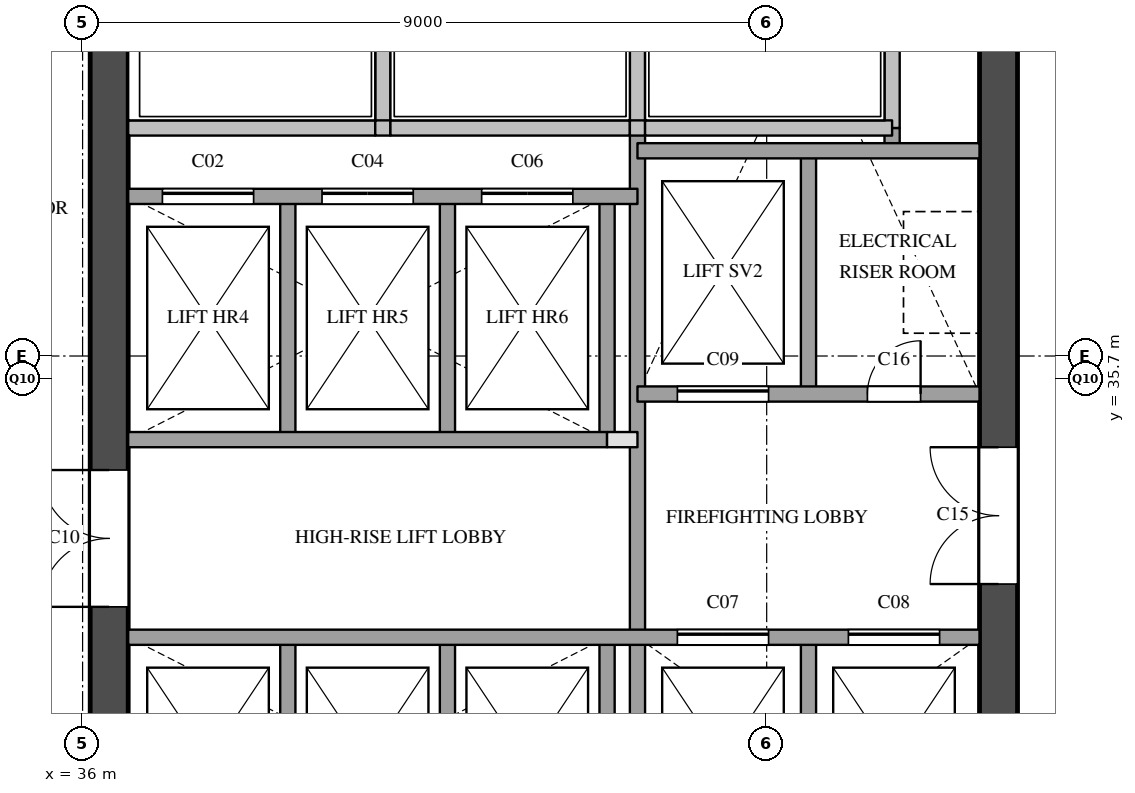
"""IFC4 building model, lengths in metres.
Left out: names, types, materials, properties, quantities, classifications, styles, units other than length and angle.
Written with IfcOpenShell. Run it as: python <this file> out.ifc"""

import sys

from ifc_helpers import new_model, si_unit, direction, frame, frame_2d, origin, place, context, subcontext, project, spatial, rectangle, extrude, element, fill, save


model = new_model("IFC4")
c1 = context("Model", 3, precision=1e-05, world=origin(), true_north=direction((0.0, 1.0)))
c2 = subcontext(c1, "Body", "Model", "MODEL_VIEW")
j1 = project(units=[si_unit("LENGTHUNIT", "METRE"), si_unit("PLANEANGLEUNIT", "RADIAN")], contexts=[c1])
p1 = place(None, origin())
s1 = spatial("IfcSite", under=j1, at=p1, CompositionType="ELEMENT")
p2 = place(p1, origin())
s2 = spatial("IfcBuilding", under=s1, at=p2, CompositionType="ELEMENT")
p3 = place(p2, frame((0.0, 0.0, 162.2)))
s3 = spatial("IfcBuildingStorey", under=s2, at=p3, CompositionType="ELEMENT", Elevation=162.2)
p4 = place(p3, frame((36.35, 29.1, 0.0), z_axis=(0.0, 0.0, 1.0), x_axis=(0.0, 1.0, 0.0)))
e1 = element("IfcWall", 1, at=p4, inside=s3, PredefinedType="SHEAR", context=c2, shape_type="SweptSolid", body=[
    extrude(rectangle(XDim=20.3, YDim=0.5, at=frame_2d((10.15, 0.0))), origin(), (0.0, 0.0, 1.0), 3.6),
])
p5 = place(p4, frame((3.6, 0.0, 0.0)))
e2 = element("IfcOpeningElement", 2, at=p5, cuts=e1, PredefinedType="OPENING", context=c2, shape_type="SweptSolid", body=[
    extrude(rectangle(XDim=1.8, YDim=2.1, at=frame_2d((0.9, 1.05))), frame((0.0, 0.26, 0.0), z_axis=(0.0, -1.0, 0.0), x_axis=(1.0, 0.0, 0.0)), (0.0, 0.0, 1.0), 0.52),
])
p6 = place(p4, frame((16.4, 0.0, 0.0)))
e3 = element("IfcOpeningElement", 3, at=p6, cuts=e1, PredefinedType="OPENING", context=c2, shape_type="SweptSolid", body=[
    extrude(rectangle(XDim=1.0, YDim=2.1, at=frame_2d((0.5, 1.05))), frame((0.0, 0.26, 0.0), z_axis=(0.0, -1.0, 0.0), x_axis=(1.0, 0.0, 0.0)), (0.0, 0.0, 1.0), 0.52),
])
p7 = place(p3, frame((48.05, 29.1, 0.0), z_axis=(0.0, 0.0, 1.0), x_axis=(0.0, 1.0, 0.0)))
e4 = element("IfcWall", 4, at=p7, inside=s3, PredefinedType="SHEAR", context=c2, shape_type="SweptSolid", body=[
    extrude(rectangle(XDim=20.3, YDim=0.5, at=frame_2d((10.15, 0.0))), origin(), (0.0, 0.0, 1.0), 3.6),
])
p8 = place(p7, frame((12.5, 0.0, 0.0)))
e5 = element("IfcOpeningElement", 5, at=p8, cuts=e4, PredefinedType="OPENING", context=c2, shape_type="SweptSolid", body=[
    extrude(rectangle(XDim=0.7, YDim=2.1, at=frame_2d((0.35, 1.05))), frame((0.0, 0.26, 0.0), z_axis=(0.0, -1.0, 0.0), x_axis=(1.0, 0.0, 0.0)), (0.0, 0.0, 1.0), 0.52),
])
p9 = place(p7, frame((3.9, 0.0, 0.0)))
e6 = element("IfcOpeningElement", 6, at=p9, cuts=e4, PredefinedType="OPENING", context=c2, shape_type="SweptSolid", body=[
    extrude(rectangle(XDim=1.8, YDim=2.1, at=frame_2d((0.9, 1.05))), frame((0.0, 0.26, 0.0), z_axis=(0.0, -1.0, 0.0), x_axis=(1.0, 0.0, 0.0)), (0.0, 0.0, 1.0), 0.52),
])
p10 = place(p3, frame((38.7, 29.1, 0.0), z_axis=(0.0, 0.0, 1.0), x_axis=(0.0, 1.0, 0.0)))
e7 = element("IfcWall", 7, at=p10, inside=s3, PredefinedType="SOLIDWALL", context=c2, shape_type="SweptSolid", body=[
    extrude(rectangle(XDim=3.2, YDim=0.2, at=frame_2d((1.6, 0.0))), origin(), (0.0, 0.0, 1.0), 3.6),
])
p11 = place(p3, frame((38.7, 34.9, 0.0), z_axis=(0.0, 0.0, 1.0), x_axis=(0.0, 1.0, 0.0)))
e8 = element("IfcWall", 8, at=p11, inside=s3, PredefinedType="SOLIDWALL", context=c2, shape_type="SweptSolid", body=[
    extrude(rectangle(XDim=3.2, YDim=0.2, at=frame_2d((1.6, 0.0))), origin(), (0.0, 0.0, 1.0), 3.6),
])
p12 = place(p3, frame((39.95, 39.0, 0.0), z_axis=(0.0, 0.0, 1.0), x_axis=(0.0, 1.0, 0.0)))
e9 = element("IfcWall", 9, at=p12, inside=s3, PredefinedType="SOLIDWALL", context=c2, shape_type="SweptSolid", body=[
    extrude(rectangle(XDim=1.78, YDim=0.2, at=frame_2d((0.89, 0.0))), origin(), (0.0, 0.0, 1.0), 3.6),
])
p13 = place(p3, frame((40.8, 29.1, 0.0), z_axis=(0.0, 0.0, 1.0), x_axis=(0.0, 1.0, 0.0)))
e10 = element("IfcWall", 10, at=p13, inside=s3, PredefinedType="SOLIDWALL", context=c2, shape_type="SweptSolid", body=[
    extrude(rectangle(XDim=3.2, YDim=0.2, at=frame_2d((1.6, 0.0))), origin(), (0.0, 0.0, 1.0), 3.6),
])
p14 = place(p3, frame((40.8, 34.9, 0.0), z_axis=(0.0, 0.0, 1.0), x_axis=(0.0, 1.0, 0.0)))
e11 = element("IfcWall", 11, at=p14, inside=s3, PredefinedType="SOLIDWALL", context=c2, shape_type="SweptSolid", body=[
    extrude(rectangle(XDim=3.2, YDim=0.2, at=frame_2d((1.6, 0.0))), origin(), (0.0, 0.0, 1.0), 3.6),
])
p15 = place(p3, frame((42.9, 29.1, 0.0), z_axis=(0.0, 0.0, 1.0), x_axis=(0.0, 1.0, 0.0)))
e12 = element("IfcWall", 12, at=p15, inside=s3, PredefinedType="SOLIDWALL", context=c2, shape_type="SweptSolid", body=[
    extrude(rectangle(XDim=3.2, YDim=0.2, at=frame_2d((1.6, 0.0))), origin(), (0.0, 0.0, 1.0), 3.6),
])
p16 = place(p3, frame((42.9, 34.9, 0.0), z_axis=(0.0, 0.0, 1.0), x_axis=(0.0, 1.0, 0.0)))
e13 = element("IfcWall", 13, at=p16, inside=s3, PredefinedType="SOLIDWALL", context=c2, shape_type="SweptSolid", body=[
    extrude(rectangle(XDim=3.2, YDim=0.2, at=frame_2d((1.6, 0.0))), origin(), (0.0, 0.0, 1.0), 3.6),
])
p17 = place(p3, frame((43.3, 29.1, 0.0), z_axis=(0.0, 0.0, 1.0), x_axis=(0.0, 1.0, 0.0)))
e14 = element("IfcWall", 14, at=p17, inside=s3, PredefinedType="SOLIDWALL", context=c2, shape_type="SweptSolid", body=[
    extrude(rectangle(XDim=9.9, YDim=0.2, at=frame_2d((4.95, 0.0))), origin(), (0.0, 0.0, 1.0), 3.6),
])
p18 = place(p3, frame((43.3, 39.0, 0.0), z_axis=(0.0, 0.0, 1.0), x_axis=(0.0, 1.0, 0.0)))
e15 = element("IfcWall", 15, at=p18, inside=s3, PredefinedType="SOLIDWALL", context=c2, shape_type="SweptSolid", body=[
    extrude(rectangle(XDim=1.78, YDim=0.2, at=frame_2d((0.89, 0.0))), origin(), (0.0, 0.0, 1.0), 3.6),
])
for number, where, z_axis, x_axis in (
    (16, (45.55, 29.1, 0.0), (0.0, 0.0, 1.0), (0.0, 1.0, 0.0)),
    (17, (45.55, 35.5, 0.0), (0.0, 0.0, 1.0), (0.0, 1.0, 0.0)),
):
    element("IfcWall", number, at=place(p3, frame(where, z_axis=z_axis, x_axis=x_axis)), inside=s3, PredefinedType="SOLIDWALL", context=c2, shape_type="SweptSolid", body=[
        extrude(rectangle(XDim=3.2, YDim=0.2, at=frame_2d((1.6, 0.0))), origin(), (0.0, 0.0, 1.0), 3.6),
    ])
p19 = place(p3, frame((46.65, 38.7, 0.0), z_axis=(0.0, 0.0, 1.0), x_axis=(0.0, 1.0, 0.0)))
e18 = element("IfcWall", 18, at=p19, inside=s3, PredefinedType="SOLIDWALL", context=c2, shape_type="SweptSolid", body=[
    extrude(rectangle(XDim=0.3, YDim=0.2, at=frame_2d((0.15, 0.0))), origin(), (0.0, 0.0, 1.0), 3.6),
])
p20 = place(p3, frame((46.65, 39.0, 0.0), z_axis=(0.0, 0.0, 1.0), x_axis=(0.0, 1.0, 0.0)))
e19 = element("IfcWall", 19, at=p20, inside=s3, PredefinedType="SOLIDWALL", context=c2, shape_type="SweptSolid", body=[
    extrude(rectangle(XDim=1.78, YDim=0.2, at=frame_2d((0.89, 0.0))), origin(), (0.0, 0.0, 1.0), 3.6),
])
p21 = place(p3, frame((36.6, 32.3, 0.0), z_axis=(0.0, 0.0, 1.0), x_axis=(1.0, 0.0, 0.0)))
e20 = element("IfcWall", 20, at=p21, inside=s3, PredefinedType="SOLIDWALL", context=c2, shape_type="SweptSolid", body=[
    extrude(rectangle(XDim=11.2, YDim=0.2, at=frame_2d((5.6, 0.0))), origin(), (0.0, 0.0, 1.0), 3.6),
])
p22 = place(p21, frame((7.225, 0.0, 0.0)))
e21 = element("IfcOpeningElement", 21, at=p22, cuts=e20, PredefinedType="OPENING", context=c2, shape_type="SweptSolid", body=[
    extrude(rectangle(XDim=1.2, YDim=2.1, at=frame_2d((0.6, 1.05))), frame((0.0, 0.11, 0.0), z_axis=(0.0, -1.0, 0.0), x_axis=(1.0, 0.0, 0.0)), (0.0, 0.0, 1.0), 0.22),
])
p23 = place(p21, frame((9.475, 0.0, 0.0)))
e22 = element("IfcOpeningElement", 22, at=p23, cuts=e20, PredefinedType="OPENING", context=c2, shape_type="SweptSolid", body=[
    extrude(rectangle(XDim=1.2, YDim=2.1, at=frame_2d((0.6, 1.05))), frame((0.0, 0.11, 0.0), z_axis=(0.0, -1.0, 0.0), x_axis=(1.0, 0.0, 0.0)), (0.0, 0.0, 1.0), 0.22),
])
p24 = place(p3, frame((42.9, 34.9, 0.0), z_axis=(0.0, 0.0, 1.0), x_axis=(1.0, 0.0, 0.0)))
e23 = element("IfcWall", 23, at=p24, inside=s3, PredefinedType="PARTITIONING", context=c2, shape_type="SweptSolid", body=[
    extrude(rectangle(XDim=0.4, YDim=0.2, at=frame_2d((0.2, 0.0))), origin(), (0.0, 0.0, 1.0), 3.6),
])
p25 = place(p3, frame((36.6, 34.9, 0.0), z_axis=(0.0, 0.0, 1.0), x_axis=(1.0, 0.0, 0.0)))
e24 = element("IfcWall", 24, at=p25, inside=s3, PredefinedType="SOLIDWALL", context=c2, shape_type="SweptSolid", body=[
    extrude(rectangle(XDim=6.3, YDim=0.2, at=frame_2d((3.15, 0.0))), origin(), (0.0, 0.0, 1.0), 3.6),
])
p26 = place(p3, frame((43.3, 35.5, 0.0), z_axis=(0.0, 0.0, 1.0), x_axis=(1.0, 0.0, 0.0)))
e25 = element("IfcWall", 25, at=p26, inside=s3, PredefinedType="SOLIDWALL", context=c2, shape_type="SweptSolid", body=[
    extrude(rectangle(XDim=4.5, YDim=0.2, at=frame_2d((2.25, 0.0))), origin(), (0.0, 0.0, 1.0), 3.6),
])
p27 = place(p26, frame((0.525, 0.0, 0.0)))
e26 = element("IfcOpeningElement", 26, at=p27, cuts=e25, PredefinedType="OPENING", context=c2, shape_type="SweptSolid", body=[
    extrude(rectangle(XDim=1.2, YDim=2.1, at=frame_2d((0.6, 1.05))), frame((0.0, 0.11, 0.0), z_axis=(0.0, -1.0, 0.0), x_axis=(1.0, 0.0, 0.0)), (0.0, 0.0, 1.0), 0.22),
])
p28 = place(p26, frame((3.025, 0.0, 0.0)))
e27 = element("IfcOpeningElement", 27, at=p28, cuts=e25, PredefinedType="OPENING", context=c2, shape_type="SweptSolid", body=[
    extrude(rectangle(XDim=0.7, YDim=2.1, at=frame_2d((0.35, 1.05))), frame((0.0, 0.11, 0.0), z_axis=(0.0, -1.0, 0.0), x_axis=(1.0, 0.0, 0.0)), (0.0, 0.0, 1.0), 0.22),
])
p29 = place(p3, frame((36.6, 38.1, 0.0), z_axis=(0.0, 0.0, 1.0), x_axis=(1.0, 0.0, 0.0)))
e28 = element("IfcWall", 28, at=p29, inside=s3, PredefinedType="SOLIDWALL", context=c2, shape_type="SweptSolid", body=[
    extrude(rectangle(XDim=6.7, YDim=0.2, at=frame_2d((3.35, 0.0))), origin(), (0.0, 0.0, 1.0), 3.6),
])
p30 = place(p29, frame((0.45, 0.0, 0.0)))
e29 = element("IfcOpeningElement", 29, at=p30, cuts=e28, PredefinedType="OPENING", context=c2, shape_type="SweptSolid", body=[
    extrude(rectangle(XDim=1.2, YDim=2.1, at=frame_2d((0.6, 1.05))), frame((0.0, 0.11, 0.0), z_axis=(0.0, -1.0, 0.0), x_axis=(1.0, 0.0, 0.0)), (0.0, 0.0, 1.0), 0.22),
])
p31 = place(p29, frame((2.55, 0.0, 0.0)))
e30 = element("IfcOpeningElement", 30, at=p31, cuts=e28, PredefinedType="OPENING", context=c2, shape_type="SweptSolid", body=[
    extrude(rectangle(XDim=1.2, YDim=2.1, at=frame_2d((0.6, 1.05))), frame((0.0, 0.11, 0.0), z_axis=(0.0, -1.0, 0.0), x_axis=(1.0, 0.0, 0.0)), (0.0, 0.0, 1.0), 0.22),
])
p32 = place(p29, frame((4.65, 0.0, 0.0)))
e31 = element("IfcOpeningElement", 31, at=p32, cuts=e28, PredefinedType="OPENING", context=c2, shape_type="SweptSolid", body=[
    extrude(rectangle(XDim=1.2, YDim=2.1, at=frame_2d((0.6, 1.05))), frame((0.0, 0.11, 0.0), z_axis=(0.0, -1.0, 0.0), x_axis=(1.0, 0.0, 0.0)), (0.0, 0.0, 1.0), 0.22),
])
p33 = place(p3, frame((43.3, 38.7, 0.0), z_axis=(0.0, 0.0, 1.0), x_axis=(1.0, 0.0, 0.0)))
e32 = element("IfcWall", 32, at=p33, inside=s3, PredefinedType="SOLIDWALL", context=c2, shape_type="SweptSolid", body=[
    extrude(rectangle(XDim=4.5, YDim=0.2, at=frame_2d((2.25, 0.0))), origin(), (0.0, 0.0, 1.0), 3.6),
])
p34 = place(p3, frame((36.6, 39.0, 0.0), z_axis=(0.0, 0.0, 1.0), x_axis=(1.0, 0.0, 0.0)))
e33 = element("IfcWall", 33, at=p34, inside=s3, PredefinedType="SOLIDWALL", context=c2, shape_type="SweptSolid", body=[
    extrude(rectangle(XDim=3.25, YDim=0.2, at=frame_2d((1.625, 0.0))), origin(), (0.0, 0.0, 1.0), 3.6),
])
p35 = place(p3, frame((39.85, 39.0, 0.0), z_axis=(0.0, 0.0, 1.0), x_axis=(1.0, 0.0, 0.0)))
e34 = element("IfcWall", 34, at=p35, inside=s3, PredefinedType="SOLIDWALL", context=c2, shape_type="SweptSolid", body=[
    extrude(rectangle(XDim=0.2, YDim=0.2, at=frame_2d((0.1, 0.0))), origin(), (0.0, 0.0, 1.0), 3.6),
])
p36 = place(p3, frame((40.05, 39.0, 0.0), z_axis=(0.0, 0.0, 1.0), x_axis=(1.0, 0.0, 0.0)))
e35 = element("IfcWall", 35, at=p36, inside=s3, PredefinedType="SOLIDWALL", context=c2, shape_type="SweptSolid", body=[
    extrude(rectangle(XDim=3.15, YDim=0.2, at=frame_2d((1.575, 0.0))), origin(), (0.0, 0.0, 1.0), 3.6),
])
p37 = place(p3, frame((43.2, 39.0, 0.0), z_axis=(0.0, 0.0, 1.0), x_axis=(1.0, 0.0, 0.0)))
e36 = element("IfcWall", 36, at=p37, inside=s3, PredefinedType="SOLIDWALL", context=c2, shape_type="SweptSolid", body=[
    extrude(rectangle(XDim=0.2, YDim=0.2, at=frame_2d((0.1, 0.0))), origin(), (0.0, 0.0, 1.0), 3.6),
])
p38 = place(p3, frame((43.4, 39.0, 0.0), z_axis=(0.0, 0.0, 1.0), x_axis=(1.0, 0.0, 0.0)))
e37 = element("IfcWall", 37, at=p38, inside=s3, PredefinedType="SOLIDWALL", context=c2, shape_type="SweptSolid", body=[
    extrude(rectangle(XDim=3.25, YDim=0.2, at=frame_2d((1.625, 0.0))), origin(), (0.0, 0.0, 1.0), 3.6),
])
p39 = place(p30, origin())
e38 = element("IfcDoor", 38, at=p39, inside=s3, OperationType="SLIDING_TO_LEFT", PredefinedType="DOOR", context=c2, shape_type="SweptSolid", body=[
    extrude(rectangle(XDim=1.2, YDim=2.1, at=frame_2d((0.6, 1.05))), frame((0.0, 0.025, 0.0), z_axis=(0.0, -1.0, 0.0), x_axis=(1.0, 0.0, 0.0)), (0.0, 0.0, 1.0), 0.05),
])
fill(e29, e38)
p40 = place(p31, origin())
e39 = element("IfcDoor", 39, at=p40, inside=s3, OperationType="SLIDING_TO_LEFT", PredefinedType="DOOR", context=c2, shape_type="SweptSolid", body=[
    extrude(rectangle(XDim=1.2, YDim=2.1, at=frame_2d((0.6, 1.05))), frame((0.0, 0.025, 0.0), z_axis=(0.0, -1.0, 0.0), x_axis=(1.0, 0.0, 0.0)), (0.0, 0.0, 1.0), 0.05),
])
fill(e30, e39)
p41 = place(p32, origin())
e40 = element("IfcDoor", 40, at=p41, inside=s3, OperationType="SLIDING_TO_LEFT", PredefinedType="DOOR", context=c2, shape_type="SweptSolid", body=[
    extrude(rectangle(XDim=1.2, YDim=2.1, at=frame_2d((0.6, 1.05))), frame((0.0, 0.025, 0.0), z_axis=(0.0, -1.0, 0.0), x_axis=(1.0, 0.0, 0.0)), (0.0, 0.0, 1.0), 0.05),
])
fill(e31, e40)
p42 = place(p22, origin())
e41 = element("IfcDoor", 41, at=p42, inside=s3, OperationType="SLIDING_TO_LEFT", PredefinedType="DOOR", context=c2, shape_type="SweptSolid", body=[
    extrude(rectangle(XDim=1.2, YDim=2.1, at=frame_2d((0.6, 1.05))), frame((0.0, 0.025, 0.0), z_axis=(0.0, -1.0, 0.0), x_axis=(1.0, 0.0, 0.0)), (0.0, 0.0, 1.0), 0.05),
])
fill(e21, e41)
p43 = place(p23, origin())
e42 = element("IfcDoor", 42, at=p43, inside=s3, OperationType="SLIDING_TO_LEFT", PredefinedType="DOOR", context=c2, shape_type="SweptSolid", body=[
    extrude(rectangle(XDim=1.2, YDim=2.1, at=frame_2d((0.6, 1.05))), frame((0.0, 0.025, 0.0), z_axis=(0.0, -1.0, 0.0), x_axis=(1.0, 0.0, 0.0)), (0.0, 0.0, 1.0), 0.05),
])
fill(e22, e42)
p44 = place(p27, origin())
e43 = element("IfcDoor", 43, at=p44, inside=s3, OperationType="SLIDING_TO_LEFT", PredefinedType="DOOR", context=c2, shape_type="SweptSolid", body=[
    extrude(rectangle(XDim=1.2, YDim=2.1, at=frame_2d((0.6, 1.05))), frame((0.0, 0.025, 0.0), z_axis=(0.0, -1.0, 0.0), x_axis=(1.0, 0.0, 0.0)), (0.0, 0.0, 1.0), 0.05),
])
fill(e26, e43)
p45 = place(p5, origin())
e44 = element("IfcDoor", 44, at=p45, inside=s3, OperationType="DOUBLE_DOOR_SINGLE_SWING", PredefinedType="DOOR", context=c2, shape_type="SweptSolid", body=[
    extrude(rectangle(XDim=1.8, YDim=2.1, at=frame_2d((0.9, 1.05))), frame((0.0, 0.025, 0.0), z_axis=(0.0, -1.0, 0.0), x_axis=(1.0, 0.0, 0.0)), (0.0, 0.0, 1.0), 0.05),
])
fill(e2, e44)
p46 = place(p9, origin())
e45 = element("IfcDoor", 45, at=p46, inside=s3, OperationType="DOUBLE_DOOR_SINGLE_SWING", PredefinedType="DOOR", context=c2, shape_type="SweptSolid", body=[
    extrude(rectangle(XDim=1.8, YDim=2.1, at=frame_2d((0.9, 1.05))), frame((0.0, 0.025, 0.0), z_axis=(0.0, -1.0, 0.0), x_axis=(1.0, 0.0, 0.0)), (0.0, 0.0, 1.0), 0.05),
])
fill(e6, e45)
p47 = place(p28, origin())
e46 = element("IfcDoor", 46, at=p47, inside=s3, OperationType="SINGLE_SWING_RIGHT", PredefinedType="DOOR", context=c2, shape_type="SweptSolid", body=[
    extrude(rectangle(XDim=0.7, YDim=2.1, at=frame_2d((0.35, 1.05))), frame((0.0, 0.025, 0.0), z_axis=(0.0, -1.0, 0.0), x_axis=(1.0, 0.0, 0.0)), (0.0, 0.0, 1.0), 0.05),
])
fill(e27, e46)
save(model, sys.argv[1])
